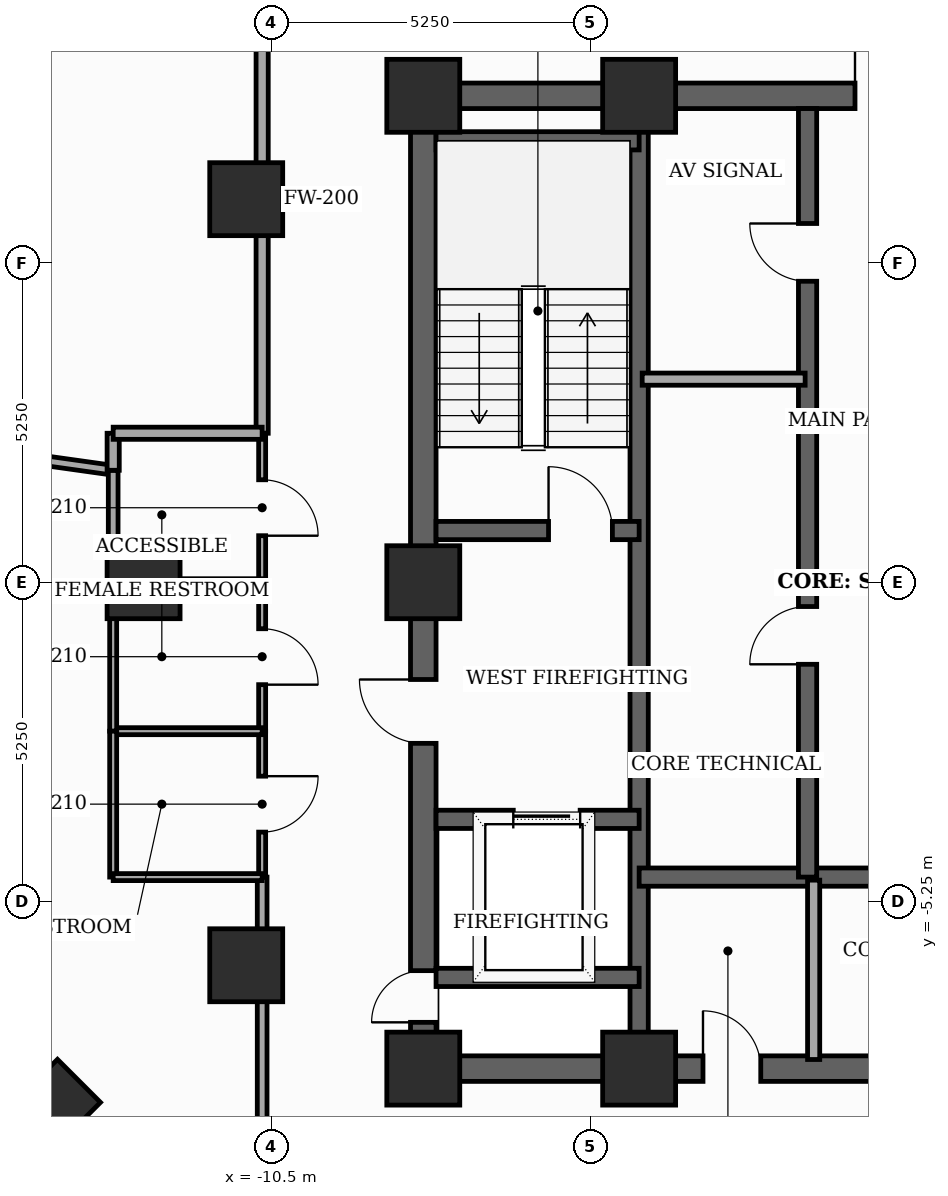
"""IFC4 building model, lengths in metres.
Left out: names, types, materials, properties, quantities, classifications, styles, units other than length and angle.
Written with IfcOpenShell. Run it as: python <this file> out.ifc"""

import sys

from ifc_helpers import new_model, si_unit, direction, frame, frame_2d, origin, origin_2d, place, context, subcontext, project, spatial, rectangle, extrude, element, fill, save


model = new_model("IFC4")
c1 = context("Model", 3, precision=1e-05, world=origin(), true_north=direction((0.0, 1.0)))
c2 = subcontext(c1, "Body", "Model", "MODEL_VIEW")
j1 = project(units=[si_unit("LENGTHUNIT", "METRE"), si_unit("PLANEANGLEUNIT", "RADIAN")], contexts=[c1])
p1 = place(None, origin())
s1 = spatial("IfcSite", under=j1, at=p1, CompositionType="ELEMENT")
p2 = place(p1, origin())
s2 = spatial("IfcBuilding", under=s1, at=p2, CompositionType="ELEMENT")
p3 = place(p2, frame((0.0, 0.0, 199.0)))
s3 = spatial("IfcBuildingStorey", under=s2, at=p3, CompositionType="ELEMENT", Elevation=199.0)
for number, where, z_axis, x_axis in (
    (1, (-8.0, -8.0, 0.0), (0.0, 0.0, 1.0), (1.0, 0.0, 0.0)),
    (2, (-4.45, -8.0, 0.0), (0.0, 0.0, 1.0), (1.0, 0.0, 0.0)),
    (3, (-4.45, 8.0, 0.0), (0.0, 0.0, 1.0), (1.0, 0.0, 0.0)),
    (4, (-8.0, 8.0, 0.0), (0.0, 0.0, 1.0), (1.0, 0.0, 0.0)),
    (5, (-8.0, 0.0, 0.0), (0.0, 0.0, 1.0), (1.0, 0.0, 0.0)),
    (6, (-10.912, 6.3, 0.0), (0.0, 0.0, 1.0), (1.0, 0.0, 0.0)),
    (7, (-12.6, 0.0, 0.0), (0.0, 0.0, 1.0), (1.0, 0.0, 0.0)),
    (8, (-10.912, -6.3, 0.0), (0.0, 0.0, 1.0), (1.0, 0.0, 0.0)),
):
    element("IfcColumn", number, at=place(p3, frame(where, z_axis=z_axis, x_axis=x_axis)), inside=s3, PredefinedType="COLUMN", context=c2, shape_type="SweptSolid", body=[
        extrude(rectangle(XDim=1.2, YDim=1.2, at=origin_2d()), origin(), (0.0, 0.0, 1.0), 3.7),
    ])
p4 = place(p3, frame((-14.016, -8.555, 0.0), z_axis=(0.0, 0.0, 1.0), x_axis=(0.707106781187, 0.707106781187, 0.0)))
e9 = element("IfcColumn", 9, at=p4, inside=s3, PredefinedType="COLUMN", context=c2, shape_type="SweptSolid", body=[
    extrude(rectangle(XDim=1.0, YDim=1.0, at=origin_2d()), origin(), (0.0, 0.0, 1.0), 3.7),
])
p5 = place(p3, frame((-8.0, -8.0, 0.0), z_axis=(0.0, 0.0, 1.0), x_axis=(0.0, 1.0, 0.0)))
e10 = element("IfcWall", 10, at=p5, inside=s3, PredefinedType="SHEAR", context=c2, shape_type="SweptSolid", body=[
    extrude(rectangle(XDim=16.0, YDim=0.42, at=frame_2d((8.0, 0.0))), origin(), (0.0, 0.0, 1.0), 3.5),
])
p6 = place(p5, frame((0.761, 0.0, 0.0)))
e11 = element("IfcOpeningElement", 11, at=p6, cuts=e10, PredefinedType="OPENING", context=c2, shape_type="SweptSolid", body=[
    extrude(rectangle(XDim=0.85, YDim=2.02, at=frame_2d((0.425, 1.01))), frame((0.0, 0.22, 0.0), z_axis=(0.0, -1.0, 0.0), x_axis=(1.0, 0.0, 0.0)), (0.0, 0.0, 1.0), 0.44),
])
p7 = place(p5, frame((5.35, 0.0, 0.0)))
e12 = element("IfcOpeningElement", 12, at=p7, cuts=e10, PredefinedType="OPENING", context=c2, shape_type="SweptSolid", body=[
    extrude(rectangle(XDim=1.05, YDim=2.15, at=frame_2d((0.525, 1.075))), frame((0.0, 0.22, 0.0), z_axis=(0.0, -1.0, 0.0), x_axis=(1.0, 0.0, 0.0)), (0.0, 0.0, 1.0), 0.44),
])
p8 = place(p3, frame((-8.0, -8.0, 0.0), z_axis=(0.0, 0.0, 1.0), x_axis=(1.0, 0.0, 0.0)))
e13 = element("IfcWall", 13, at=p8, inside=s3, PredefinedType="SHEAR", context=c2, shape_type="SweptSolid", body=[
    extrude(rectangle(XDim=16.0, YDim=0.42, at=frame_2d((8.0, 0.0))), origin(), (0.0, 0.0, 1.0), 3.5),
])
p9 = place(p8, frame((4.6, 0.0, 0.0)))
e14 = element("IfcOpeningElement", 14, at=p9, cuts=e13, PredefinedType="OPENING", context=c2, shape_type="SweptSolid", body=[
    extrude(rectangle(XDim=0.95, YDim=2.1, at=frame_2d((0.475, 1.05))), frame((0.0, 0.22, 0.0), z_axis=(0.0, -1.0, 0.0), x_axis=(1.0, 0.0, 0.0)), (0.0, 0.0, 1.0), 0.44),
])
p10 = place(p8, frame((7.52, 0.0, 0.0)))
e15 = element("IfcOpeningElement", 15, at=p10, cuts=e13, PredefinedType="OPENING", context=c2, shape_type="SweptSolid", body=[
    extrude(rectangle(XDim=0.95, YDim=2.1, at=frame_2d((0.475, 1.05))), frame((0.0, 0.22, 0.0), z_axis=(0.0, -1.0, 0.0), x_axis=(1.0, 0.0, 0.0)), (0.0, 0.0, 1.0), 0.44),
])
p11 = place(p8, frame((10.45, 0.0, 0.0)))
e16 = element("IfcOpeningElement", 16, at=p11, cuts=e13, PredefinedType="OPENING", context=c2, shape_type="SweptSolid", body=[
    extrude(rectangle(XDim=0.95, YDim=2.1, at=frame_2d((0.475, 1.05))), frame((0.0, 0.22, 0.0), z_axis=(0.0, -1.0, 0.0), x_axis=(1.0, 0.0, 0.0)), (0.0, 0.0, 1.0), 0.44),
])
p12 = place(p3, frame((-8.0, 8.0, 0.0), z_axis=(0.0, 0.0, 1.0), x_axis=(1.0, 0.0, 0.0)))
e17 = element("IfcWall", 17, at=p12, inside=s3, PredefinedType="SHEAR", context=c2, shape_type="SweptSolid", body=[
    extrude(rectangle(XDim=16.0, YDim=0.42, at=frame_2d((8.0, 0.0))), origin(), (0.0, 0.0, 1.0), 3.5),
])
p13 = place(p12, frame((7.1, 0.0, 0.0)))
e18 = element("IfcOpeningElement", 18, at=p13, cuts=e17, PredefinedType="OPENING", context=c2, shape_type="SweptSolid", body=[
    extrude(rectangle(XDim=1.8, YDim=2.15, at=frame_2d((0.9, 1.075))), frame((0.0, 0.22, 0.0), z_axis=(0.0, -1.0, 0.0), x_axis=(1.0, 0.0, 0.0)), (0.0, 0.0, 1.0), 0.44),
])
p14 = place(p3, frame((-4.45, -7.79, 0.0), z_axis=(0.0, 0.0, 1.0), x_axis=(0.0, 1.0, 0.0)))
e19 = element("IfcWall", 19, at=p14, inside=s3, PredefinedType="SHEAR", context=c2, shape_type="SweptSolid", body=[
    extrude(rectangle(XDim=15.58, YDim=0.3, at=frame_2d((7.79, 0.0))), origin(), (0.0, 0.0, 1.0), 3.5),
])
p15 = place(p3, frame((-7.79, 0.85, 0.0), z_axis=(0.0, 0.0, 1.0), x_axis=(1.0, 0.0, 0.0)))
e20 = element("IfcWall", 20, at=p15, inside=s3, PredefinedType="SHEAR", context=c2, shape_type="SweptSolid", body=[
    extrude(rectangle(XDim=3.34, YDim=0.3, at=frame_2d((1.67, 0.0))), origin(), (0.0, 0.0, 1.0), 3.5),
])
p16 = place(p15, frame((1.85, 0.0, 0.0)))
e21 = element("IfcOpeningElement", 21, at=p16, cuts=e20, PredefinedType="OPENING", context=c2, shape_type="SweptSolid", body=[
    extrude(rectangle(XDim=1.05, YDim=2.15, at=frame_2d((0.525, 1.075))), frame((0.0, 0.16, 0.0), z_axis=(0.0, -1.0, 0.0), x_axis=(1.0, 0.0, 0.0)), (0.0, 0.0, 1.0), 0.32),
])
p17 = place(p3, frame((-7.79, 7.26, 0.0), z_axis=(0.0, 0.0, 1.0), x_axis=(1.0, 0.0, 0.0)))
e22 = element("IfcWall", 22, at=p17, inside=s3, PredefinedType="SHEAR", context=c2, shape_type="SweptSolid", body=[
    extrude(rectangle(XDim=3.34, YDim=0.3, at=frame_2d((1.67, 0.0))), origin(), (0.0, 0.0, 1.0), 3.5),
])
p18 = place(p3, frame((-7.79, -3.9, 0.0), z_axis=(0.0, 0.0, 1.0), x_axis=(1.0, 0.0, 0.0)))
e23 = element("IfcWall", 23, at=p18, inside=s3, PredefinedType="SHEAR", context=c2, shape_type="SweptSolid", body=[
    extrude(rectangle(XDim=3.34, YDim=0.3, at=frame_2d((1.67, 0.0))), origin(), (0.0, 0.0, 1.0), 3.5),
])
p19 = place(p18, frame((1.27, 0.0, 0.0)))
e24 = element("IfcOpeningElement", 24, at=p19, cuts=e23, PredefinedType="OPENING", context=c2, shape_type="SweptSolid", body=[
    extrude(rectangle(XDim=1.1, YDim=2.1, at=frame_2d((0.55, 1.05))), frame((0.0, 0.16, 0.0), z_axis=(0.0, -1.0, 0.0), x_axis=(1.0, 0.0, 0.0)), (0.0, 0.0, 1.0), 0.32),
])
p20 = place(p3, frame((-7.79, -6.5, 0.0), z_axis=(0.0, 0.0, 1.0), x_axis=(1.0, 0.0, 0.0)))
e25 = element("IfcWall", 25, at=p20, inside=s3, PredefinedType="SHEAR", context=c2, shape_type="SweptSolid", body=[
    extrude(rectangle(XDim=3.34, YDim=0.3, at=frame_2d((1.67, 0.0))), origin(), (0.0, 0.0, 1.0), 3.5),
])
p21 = place(p3, frame((-4.45, -4.85, 0.0), z_axis=(0.0, 0.0, 1.0), x_axis=(1.0, 0.0, 0.0)))
e26 = element("IfcWall", 26, at=p21, inside=s3, PredefinedType="SHEAR", context=c2, shape_type="SweptSolid", body=[
    extrude(rectangle(XDim=8.9, YDim=0.3, at=frame_2d((4.45, 0.0))), origin(), (0.0, 0.0, 1.0), 3.5),
])
p22 = place(p3, frame((-1.68, -4.85, 0.0), z_axis=(0.0, 0.0, 1.0), x_axis=(0.0, 1.0, 0.0)))
e27 = element("IfcWall", 27, at=p22, inside=s3, PredefinedType="SHEAR", context=c2, shape_type="SweptSolid", body=[
    extrude(rectangle(XDim=12.64, YDim=0.3, at=frame_2d((6.32, 0.0))), origin(), (0.0, 0.0, 1.0), 3.5),
])
p23 = place(p22, frame((3.5, 0.0, 0.0)))
e28 = element("IfcOpeningElement", 28, at=p23, cuts=e27, PredefinedType="OPENING", context=c2, shape_type="SweptSolid", body=[
    extrude(rectangle(XDim=0.95, YDim=2.1, at=frame_2d((0.475, 1.05))), frame((0.0, 0.16, 0.0), z_axis=(0.0, -1.0, 0.0), x_axis=(1.0, 0.0, 0.0)), (0.0, 0.0, 1.0), 0.32),
])
p24 = place(p22, frame((9.8, 0.0, 0.0)))
e29 = element("IfcOpeningElement", 29, at=p24, cuts=e27, PredefinedType="OPENING", context=c2, shape_type="SweptSolid", body=[
    extrude(rectangle(XDim=0.95, YDim=2.1, at=frame_2d((0.475, 1.05))), frame((0.0, 0.16, 0.0), z_axis=(0.0, -1.0, 0.0), x_axis=(1.0, 0.0, 0.0)), (0.0, 0.0, 1.0), 0.32),
])
p25 = place(p3, frame((-1.58, -7.85, 0.0), z_axis=(0.0, 0.0, 1.0), x_axis=(0.0, 1.0, 0.0)))
e30 = element("IfcWall", 30, at=p25, inside=s3, PredefinedType="SOLIDWALL", context=c2, shape_type="SweptSolid", body=[
    extrude(rectangle(XDim=2.95, YDim=0.2, at=frame_2d((1.475, 0.0))), origin(), (0.0, 0.0, 1.0), 2.885),
])
p26 = place(p3, frame((-4.4, 3.34, 0.0), z_axis=(0.0, 0.0, 1.0), x_axis=(1.0, 0.0, 0.0)))
e31 = element("IfcWall", 31, at=p26, inside=s3, PredefinedType="SOLIDWALL", context=c2, shape_type="SweptSolid", body=[
    extrude(rectangle(XDim=2.68, YDim=0.2, at=frame_2d((1.34, 0.0))), origin(), (0.0, 0.0, 1.0), 3.5),
])
p27 = place(p3, frame((-10.65, 0.0, 0.0), z_axis=(0.0, 0.0, 1.0), x_axis=(0.0, -1.0, 0.0)))
e32 = element("IfcWall", 32, at=p27, inside=s3, PredefinedType="PARTITIONING", context=c2, shape_type="SweptSolid", body=[
    extrude(rectangle(XDim=2.45, YDim=0.115, at=frame_2d((1.225, 0.0))), origin(), (0.0, 0.0, 1.0), 2.885),
])
p28 = place(p27, frame((0.765, 0.0, 0.0)))
e33 = element("IfcOpeningElement", 33, at=p28, cuts=e32, PredefinedType="OPENING", context=c2, shape_type="SweptSolid", body=[
    extrude(rectangle(XDim=0.92, YDim=2.1, at=frame_2d((0.46, 1.05))), frame((0.0, 0.067, 0.0), z_axis=(0.0, -1.0, 0.0), x_axis=(1.0, 0.0, 0.0)), (0.0, 0.0, 1.0), 0.135),
])
p29 = place(p3, frame((-10.65, -2.45, 0.0), z_axis=(0.0, 0.0, 1.0), x_axis=(0.0, -1.0, 0.0)))
e34 = element("IfcWall", 34, at=p29, inside=s3, PredefinedType="PARTITIONING", context=c2, shape_type="SweptSolid", body=[
    extrude(rectangle(XDim=2.4, YDim=0.115, at=frame_2d((1.2, 0.0))), origin(), (0.0, 0.0, 1.0), 3.5),
])
p30 = place(p29, frame((0.74, 0.0, 0.0)))
e35 = element("IfcOpeningElement", 35, at=p30, cuts=e34, PredefinedType="OPENING", context=c2, shape_type="SweptSolid", body=[
    extrude(rectangle(XDim=0.92, YDim=2.1, at=frame_2d((0.46, 1.05))), frame((0.0, 0.067, 0.0), z_axis=(0.0, -1.0, 0.0), x_axis=(1.0, 0.0, 0.0)), (0.0, 0.0, 1.0), 0.135),
])
p31 = place(p3, frame((-10.65, -4.85, 0.0), z_axis=(0.0, 0.0, 1.0), x_axis=(0.0, -1.0, 0.0)))
e36 = element("IfcWall", 36, at=p31, inside=s3, PredefinedType="PARTITIONING", context=c2, shape_type="SweptSolid", body=[
    extrude(rectangle(XDim=5.3, YDim=0.16, at=frame_2d((2.65, 0.0))), origin(), (0.0, 0.0, 1.0), 2.885),
])
p32 = place(p3, frame((-10.65, 10.15, 0.0), z_axis=(0.0, 0.0, 1.0), x_axis=(0.0, -1.0, 0.0)))
e37 = element("IfcWall", 37, at=p32, inside=s3, PredefinedType="SOLIDWALL", context=c2, shape_type="SweptSolid", body=[
    extrude(rectangle(XDim=7.7, YDim=0.2, at=frame_2d((3.85, 0.0))), origin(), (0.0, 0.0, 1.0), 2.885),
])
p33 = place(p3, frame((-10.65, 2.45, 0.0), z_axis=(0.0, 0.0, 1.0), x_axis=(0.0, -1.0, 0.0)))
e38 = element("IfcWall", 38, at=p33, inside=s3, PredefinedType="PARTITIONING", context=c2, shape_type="SweptSolid", body=[
    extrude(rectangle(XDim=2.45, YDim=0.115, at=frame_2d((1.225, 0.0))), origin(), (0.0, 0.0, 1.0), 2.885),
])
p34 = place(p33, frame((0.765, 0.0, 0.0)))
e39 = element("IfcOpeningElement", 39, at=p34, cuts=e38, PredefinedType="OPENING", context=c2, shape_type="SweptSolid", body=[
    extrude(rectangle(XDim=0.92, YDim=2.1, at=frame_2d((0.46, 1.05))), frame((0.0, 0.067, 0.0), z_axis=(0.0, -1.0, 0.0), x_axis=(1.0, 0.0, 0.0)), (0.0, 0.0, 1.0), 0.135),
])
p35 = place(p3, frame((-13.1, -2.45, 0.0), z_axis=(0.0, 0.0, 1.0), x_axis=(1.0, 0.0, 0.0)))
e40 = element("IfcWall", 40, at=p35, inside=s3, PredefinedType="PARTITIONING", context=c2, shape_type="SweptSolid", body=[
    extrude(rectangle(XDim=2.45, YDim=0.115, at=frame_2d((1.225, 0.0))), origin(), (0.0, 0.0, 1.0), 2.885),
])
p36 = place(p3, frame((-13.1, 0.0, 0.0), z_axis=(0.0, 0.0, 1.0), x_axis=(0.0, -1.0, 0.0)))
e41 = element("IfcWall", 41, at=p36, inside=s3, PredefinedType="PARTITIONING", context=c2, shape_type="SweptSolid", body=[
    extrude(rectangle(XDim=2.45, YDim=0.115, at=frame_2d((1.225, 0.0))), origin(), (0.0, 0.0, 1.0), 2.985),
])
p37 = place(p3, frame((-10.65, 0.0, 0.0), z_axis=(0.0, 0.0, 1.0), x_axis=(-1.0, 0.0, 0.0)))
e42 = element("IfcWall", 42, at=p37, inside=s3, PredefinedType="PARTITIONING", context=c2, shape_type="SweptSolid", body=[
    extrude(rectangle(XDim=2.45, YDim=0.115, at=frame_2d((1.225, 0.0))), origin(), (0.0, 0.0, 1.0), 2.885),
])
p38 = place(p3, frame((-13.1, -2.45, 0.0), z_axis=(0.0, 0.0, 1.0), x_axis=(0.0, -1.0, 0.0)))
e43 = element("IfcWall", 43, at=p38, inside=s3, PredefinedType="PARTITIONING", context=c2, shape_type="SweptSolid", body=[
    extrude(rectangle(XDim=2.4, YDim=0.115, at=frame_2d((1.2, 0.0))), origin(), (0.0, 0.0, 1.0), 3.5),
])
p39 = place(p3, frame((-13.1, -4.85, 0.0), z_axis=(0.0, 0.0, 1.0), x_axis=(1.0, 0.0, 0.0)))
e44 = element("IfcWall", 44, at=p39, inside=s3, PredefinedType="PARTITIONING", context=c2, shape_type="SweptSolid", body=[
    extrude(rectangle(XDim=2.45, YDim=0.115, at=frame_2d((1.225, 0.0))), origin(), (0.0, 0.0, 1.0), 2.885),
])
p40 = place(p3, frame((-13.1, 1.841, 0.0), z_axis=(0.0, 0.0, 1.0), x_axis=(-0.990254946284, 0.139266440179, 0.0)))
e45 = element("IfcWall", 45, at=p40, inside=s3, PredefinedType="PARTITIONING", context=c2, shape_type="SweptSolid", body=[
    extrude(rectangle(XDim=5.156, YDim=0.16, at=frame_2d((2.578, 0.0))), origin(), (0.0, 0.0, 1.0), 2.985),
])
p41 = place(p3, frame((-13.1, 0.0, 0.0), z_axis=(0.0, 0.0, 1.0), x_axis=(0.0, 1.0, 0.0)))
e46 = element("IfcWall", 46, at=p41, inside=s3, PredefinedType="PARTITIONING", context=c2, shape_type="SweptSolid", body=[
    extrude(rectangle(XDim=1.841, YDim=0.16, at=frame_2d((0.92, 0.0))), origin(), (0.0, 0.0, 1.0), 2.985),
])
p42 = place(p3, frame((-13.1, 1.841, 0.0), z_axis=(0.0, 0.0, 1.0), x_axis=(0.0, 1.0, 0.0)))
e47 = element("IfcWall", 47, at=p42, inside=s3, PredefinedType="SOLIDWALL", context=c2, shape_type="SweptSolid", body=[
    extrude(rectangle(XDim=0.609, YDim=0.2, at=frame_2d((0.304, 0.0))), origin(), (0.0, 0.0, 1.0), 3.5),
])
p43 = place(p3, frame((-13.1, 2.45, 0.0), z_axis=(0.0, 0.0, 1.0), x_axis=(1.0, 0.0, 0.0)))
e48 = element("IfcWall", 48, at=p43, inside=s3, PredefinedType="SOLIDWALL", context=c2, shape_type="SweptSolid", body=[
    extrude(rectangle(XDim=2.45, YDim=0.2, at=frame_2d((1.225, 0.0))), origin(), (0.0, 0.0, 1.0), 2.885),
])
p44 = place(p6, origin())
e49 = element("IfcDoor", 49, at=p44, inside=s3, OperationType="SINGLE_SWING_LEFT", PredefinedType="TRAPDOOR", context=c2, shape_type="SweptSolid", body=[
    extrude(rectangle(XDim=0.85, YDim=2.02, at=frame_2d((0.425, 1.01))), frame((0.0, 0.025, 0.0), z_axis=(0.0, -1.0, 0.0), x_axis=(1.0, 0.0, 0.0)), (0.0, 0.0, 1.0), 0.05),
])
fill(e11, e49)
p45 = place(p7, origin())
e50 = element("IfcDoor", 50, at=p45, inside=s3, OperationType="SINGLE_SWING_RIGHT", PredefinedType="DOOR", context=c2, shape_type="SweptSolid", body=[
    extrude(rectangle(XDim=1.05, YDim=2.15, at=frame_2d((0.525, 1.075))), frame((0.0, 0.025, 0.0), z_axis=(0.0, -1.0, 0.0), x_axis=(1.0, 0.0, 0.0)), (0.0, 0.0, 1.0), 0.05),
])
fill(e12, e50)
p46 = place(p9, origin())
e51 = element("IfcDoor", 51, at=p46, inside=s3, OperationType="SINGLE_SWING_LEFT", PredefinedType="DOOR", context=c2, shape_type="SweptSolid", body=[
    extrude(rectangle(XDim=0.95, YDim=2.1, at=frame_2d((0.475, 1.05))), frame((0.0, 0.025, 0.0), z_axis=(0.0, -1.0, 0.0), x_axis=(1.0, 0.0, 0.0)), (0.0, 0.0, 1.0), 0.05),
])
fill(e14, e51)
p47 = place(p13, origin())
e52 = element("IfcDoor", 52, at=p47, inside=s3, OperationType="DOUBLE_DOOR_SINGLE_SWING", PredefinedType="DOOR", context=c2, shape_type="SweptSolid", body=[
    extrude(rectangle(XDim=1.8, YDim=2.15, at=frame_2d((0.9, 1.075))), frame((0.0, 0.025, 0.0), z_axis=(0.0, -1.0, 0.0), x_axis=(1.0, 0.0, 0.0)), (0.0, 0.0, 1.0), 0.05),
])
fill(e18, e52)
p48 = place(p16, origin())
e53 = element("IfcDoor", 53, at=p48, inside=s3, OperationType="SINGLE_SWING_LEFT", PredefinedType="DOOR", context=c2, shape_type="SweptSolid", body=[
    extrude(rectangle(XDim=1.05, YDim=2.15, at=frame_2d((0.525, 1.075))), frame((0.0, 0.025, 0.0), z_axis=(0.0, -1.0, 0.0), x_axis=(1.0, 0.0, 0.0)), (0.0, 0.0, 1.0), 0.05),
])
fill(e21, e53)
p49 = place(p19, origin())
e54 = element("IfcDoor", 54, at=p49, inside=s3, OperationType="SLIDING_TO_LEFT", PredefinedType="DOOR", context=c2, shape_type="SweptSolid", body=[
    extrude(rectangle(XDim=1.1, YDim=2.1, at=frame_2d((0.55, 1.05))), frame((0.0, 0.025, 0.0), z_axis=(0.0, -1.0, 0.0), x_axis=(1.0, 0.0, 0.0)), (0.0, 0.0, 1.0), 0.05),
])
fill(e24, e54)
p50 = place(p23, origin())
e55 = element("IfcDoor", 55, at=p50, inside=s3, OperationType="SINGLE_SWING_LEFT", PredefinedType="DOOR", context=c2, shape_type="SweptSolid", body=[
    extrude(rectangle(XDim=0.95, YDim=2.1, at=frame_2d((0.475, 1.05))), frame((0.0, 0.025, 0.0), z_axis=(0.0, -1.0, 0.0), x_axis=(1.0, 0.0, 0.0)), (0.0, 0.0, 1.0), 0.05),
])
fill(e28, e55)
p51 = place(p24, origin())
e56 = element("IfcDoor", 56, at=p51, inside=s3, OperationType="SINGLE_SWING_RIGHT", PredefinedType="DOOR", context=c2, shape_type="SweptSolid", body=[
    extrude(rectangle(XDim=0.95, YDim=2.1, at=frame_2d((0.475, 1.05))), frame((0.0, 0.025, 0.0), z_axis=(0.0, -1.0, 0.0), x_axis=(1.0, 0.0, 0.0)), (0.0, 0.0, 1.0), 0.05),
])
fill(e29, e56)
p52 = place(p28, origin())
e57 = element("IfcDoor", 57, at=p52, inside=s3, OperationType="SINGLE_SWING_RIGHT", PredefinedType="DOOR", context=c2, shape_type="SweptSolid", body=[
    extrude(rectangle(XDim=0.92, YDim=2.1, at=frame_2d((0.46, 1.05))), frame((0.0, 0.025, 0.0), z_axis=(0.0, -1.0, 0.0), x_axis=(1.0, 0.0, 0.0)), (0.0, 0.0, 1.0), 0.05),
])
fill(e33, e57)
p53 = place(p30, origin())
e58 = element("IfcDoor", 58, at=p53, inside=s3, OperationType="SINGLE_SWING_LEFT", PredefinedType="DOOR", context=c2, shape_type="SweptSolid", body=[
    extrude(rectangle(XDim=0.92, YDim=2.1, at=frame_2d((0.46, 1.05))), frame((0.0, 0.025, 0.0), z_axis=(0.0, -1.0, 0.0), x_axis=(1.0, 0.0, 0.0)), (0.0, 0.0, 1.0), 0.05),
])
fill(e35, e58)
p54 = place(p34, origin())
e59 = element("IfcDoor", 59, at=p54, inside=s3, OperationType="SINGLE_SWING_RIGHT", PredefinedType="DOOR", context=c2, shape_type="SweptSolid", body=[
    extrude(rectangle(XDim=0.92, YDim=2.1, at=frame_2d((0.46, 1.05))), frame((0.0, 0.025, 0.0), z_axis=(0.0, -1.0, 0.0), x_axis=(1.0, 0.0, 0.0)), (0.0, 0.0, 1.0), 0.05),
])
fill(e39, e59)
save(model, sys.argv[1])
